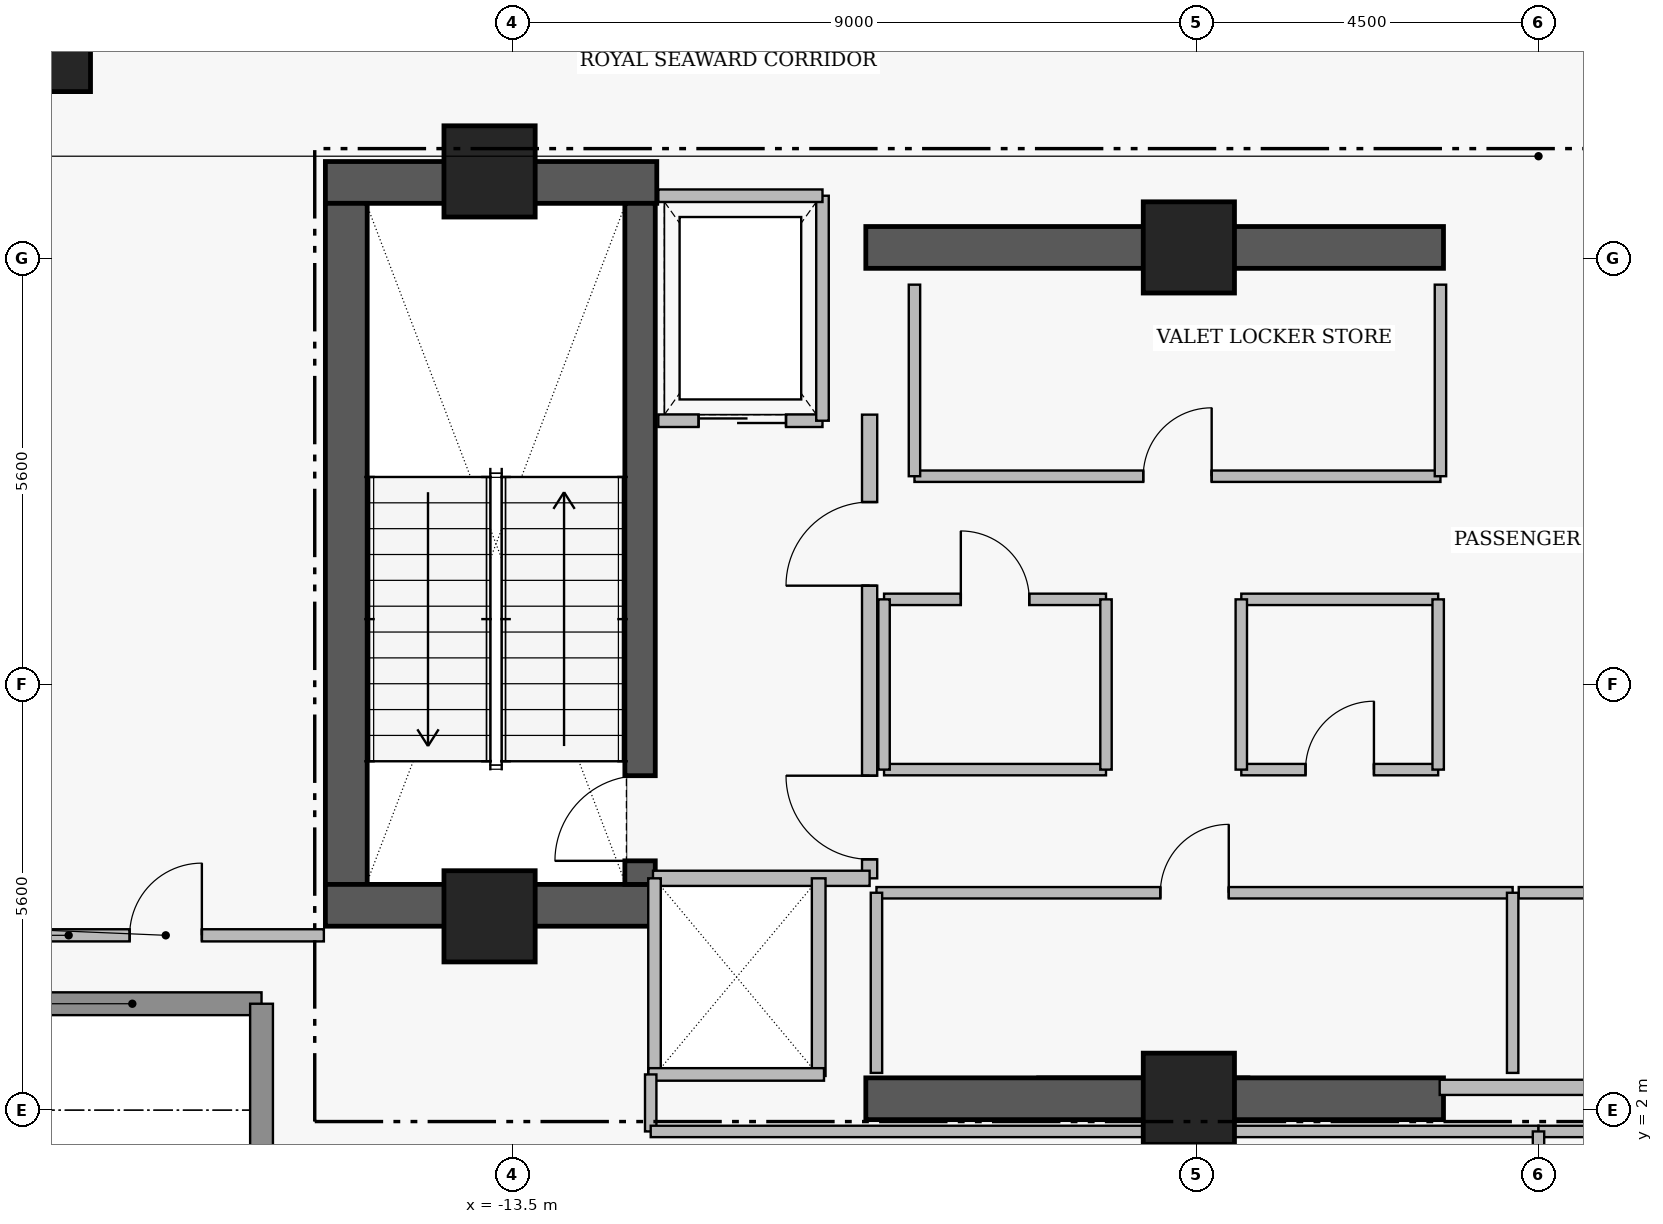
"""IFC4 building model, lengths in metres.
Left out: names, types, materials, properties, quantities, classifications, styles, units other than length and angle.
Written with IfcOpenShell. Run it as: python <this file> out.ifc"""

import sys

from ifc_helpers import new_model, si_unit, direction, frame, frame_2d, origin, origin_2d, place, context, subcontext, project, spatial, rectangle, extrude, element, fill, save


model = new_model("IFC4")
c1 = context("Model", 3, precision=1e-05, world=origin(), true_north=direction((0.0, 1.0)))
c2 = subcontext(c1, "Body", "Model", "MODEL_VIEW")
j1 = project(units=[si_unit("LENGTHUNIT", "METRE"), si_unit("PLANEANGLEUNIT", "RADIAN")], contexts=[c1])
p1 = place(None, origin())
s1 = spatial("IfcSite", under=j1, at=p1, CompositionType="ELEMENT")
p2 = place(p1, origin())
s2 = spatial("IfcBuilding", under=s1, at=p2, CompositionType="ELEMENT")
p3 = place(p2, frame((0.0, 0.0, 288.45)))
s3 = spatial("IfcBuildingStorey", under=s2, at=p3, CompositionType="ELEMENT", Elevation=288.45)
p4 = place(p3, frame((-15.96, 14.205, 0.0), z_axis=(0.0, 0.0, 1.0), x_axis=(1.0, 0.0, 0.0)))
e1 = element("IfcWall", 1, at=p4, inside=s3, PredefinedType="SHEAR", context=c2, shape_type="SweptSolid", body=[
    extrude(rectangle(XDim=4.36, YDim=0.55, at=frame_2d((2.18, 0.0))), origin(), (0.0, 0.0, 1.0), 4.21),
])
p5 = place(p3, frame((-15.685, 4.97, 0.0), z_axis=(0.0, 0.0, 1.0), x_axis=(0.0, 1.0, 0.0)))
e2 = element("IfcWall", 2, at=p5, inside=s3, PredefinedType="SHEAR", context=c2, shape_type="SweptSolid", body=[
    extrude(rectangle(XDim=8.96, YDim=0.55, at=frame_2d((4.48, 0.0))), origin(), (0.0, 0.0, 1.0), 4.21),
])
p6 = place(p3, frame((-15.96, 4.695, 0.0), z_axis=(0.0, 0.0, 1.0), x_axis=(1.0, 0.0, 0.0)))
e3 = element("IfcWall", 3, at=p6, inside=s3, PredefinedType="SHEAR", context=c2, shape_type="SweptSolid", body=[
    extrude(rectangle(XDim=4.36, YDim=0.55, at=frame_2d((2.18, 0.0))), origin(), (0.0, 0.0, 1.0), 4.21),
])
for number, where, z_axis, x_axis in (
    (4, (-8.85, 2.15, 0.0), (0.0, 0.0, 1.0), (1.0, 0.0, 0.0)),
    (5, (-8.85, 13.35, 0.0), (0.0, 0.0, 1.0), (1.0, 0.0, 0.0)),
):
    element("IfcWall", number, at=place(p3, frame(where, z_axis=z_axis, x_axis=x_axis)), inside=s3, PredefinedType="SHEAR", context=c2, shape_type="SweptSolid", body=[
        extrude(rectangle(XDim=7.6, YDim=0.55, at=frame_2d((3.8, 0.0))), origin(), (0.0, 0.0, 1.0), 4.18),
    ])
p7 = place(p3, frame((-11.82, 4.97, 0.0), z_axis=(0.0, 0.0, 1.0), x_axis=(0.0, 1.0, 0.0)))
e6 = element("IfcWall", 6, at=p7, inside=s3, PredefinedType="SHEAR", context=c2, shape_type="SweptSolid", body=[
    extrude(rectangle(XDim=8.96, YDim=0.4, at=frame_2d((4.48, 0.0))), origin(), (0.0, 0.0, 1.0), 4.21),
])
p8 = place(p7, frame((0.31, 0.0, 0.0)))
e7 = element("IfcOpeningElement", 7, at=p8, cuts=e6, PredefinedType="OPENING", context=c2, shape_type="SweptSolid", body=[
    extrude(rectangle(XDim=1.12, YDim=2.22, at=frame_2d((0.56, 1.11))), frame((0.0, 0.21, 0.0), z_axis=(0.0, -1.0, 0.0), x_axis=(1.0, 0.0, 0.0)), (0.0, 0.0, 1.0), 0.42),
])
for number, where, z_axis, x_axis in (
    (8, (-13.8, 14.35, 0.0), (0.0, 0.0, 1.0), (1.0, 0.0, 0.0)),
    (9, (-4.6, 13.35, 0.0), (0.0, 0.0, 1.0), (1.0, 0.0, 0.0)),
    (10, (-13.8, 4.55, 0.0), (0.0, 0.0, 1.0), (1.0, 0.0, 0.0)),
    (11, (-4.6, 2.15, 0.0), (0.0, 0.0, 1.0), (1.0, 0.0, 0.0)),
):
    element("IfcColumn", number, at=place(p3, frame(where, z_axis=z_axis, x_axis=x_axis)), inside=s3, PredefinedType="COLUMN", context=c2, shape_type="SweptSolid", body=[
        extrude(rectangle(XDim=1.2, YDim=1.2, at=origin_2d()), origin(), (0.0, 0.0, 1.0), 4.4),
    ])
p9 = place(p3, frame((-19.55, 15.9, 0.0), z_axis=(0.0, 0.0, 1.0), x_axis=(1.0, 0.0, 0.0)))
e12 = element("IfcColumn", 12, at=p9, inside=s3, PredefinedType="COLUMN", context=c2, shape_type="SweptSolid", body=[
    extrude(rectangle(XDim=1.0, YDim=1.0, at=origin_2d()), origin(), (0.0, 0.0, 1.0), 4.4),
])
for number, where, z_axis, x_axis in (
    (13, (-16.8, 3.4, 0.0), (0.0, 0.0, 1.0), (-1.0, 0.0, 0.0)),
    (14, (-16.8, 0.0, 0.0), (0.0, 0.0, 1.0), (0.0, 1.0, 0.0)),
):
    element("IfcWall", number, at=place(p3, frame(where, z_axis=z_axis, x_axis=x_axis)), inside=s3, PredefinedType="STANDARD", context=c2, shape_type="SweptSolid", body=[
        extrude(rectangle(XDim=3.4, YDim=0.3, at=frame_2d((1.7, 0.0))), origin(), (0.0, 0.0, 1.0), 4.18),
    ])
p10 = place(p3, frame((-8.8, 5.05, 0.0), z_axis=(0.0, 0.0, 1.0), x_axis=(0.0, 1.0, 0.0)))
e15 = element("IfcWall", 15, at=p10, inside=s3, PredefinedType="PARTITIONING", context=c2, shape_type="SweptSolid", body=[
    extrude(rectangle(XDim=6.1, YDim=0.2, at=frame_2d((3.05, 0.0))), origin(), (0.0, 0.0, 1.0), 4.18),
])
p11 = place(p10, frame((0.25, 0.0, 0.0)))
e16 = element("IfcOpeningElement", 16, at=p11, cuts=e15, PredefinedType="OPENING", context=c2, shape_type="SweptSolid", body=[
    extrude(rectangle(XDim=1.1, YDim=2.2, at=frame_2d((0.55, 1.1))), frame((0.0, 0.11, 0.0), z_axis=(0.0, -1.0, 0.0), x_axis=(1.0, 0.0, 0.0)), (0.0, 0.0, 1.0), 0.22),
])
p12 = place(p10, frame((3.85, 0.0, 0.0)))
e17 = element("IfcOpeningElement", 17, at=p12, cuts=e15, PredefinedType="OPENING", context=c2, shape_type="SweptSolid", body=[
    extrude(rectangle(XDim=1.1, YDim=2.2, at=frame_2d((0.55, 1.1))), frame((0.0, 0.11, 0.0), z_axis=(0.0, -1.0, 0.0), x_axis=(1.0, 0.0, 0.0)), (0.0, 0.0, 1.0), 0.22),
])
p13 = place(p3, frame((-11.58, 11.07, 0.0), z_axis=(0.0, 0.0, 1.0), x_axis=(1.0, 0.0, 0.0)))
e18 = element("IfcWall", 18, at=p13, inside=s3, PredefinedType="PARTITIONING", context=c2, shape_type="SweptSolid", body=[
    extrude(rectangle(XDim=2.16, YDim=0.165, at=frame_2d((1.08, 0.0))), origin(), (0.0, 0.0, 1.0), 4.18),
])
p14 = place(p13, frame((0.53, 0.0, 0.0)))
e19 = element("IfcOpeningElement", 19, at=p14, cuts=e18, PredefinedType="OPENING", context=c2, shape_type="SweptSolid", body=[
    extrude(rectangle(XDim=1.15, YDim=2.25, at=frame_2d((0.575, 1.125))), frame((0.0, 0.093, 0.0), z_axis=(0.0, -1.0, 0.0), x_axis=(1.0, 0.0, 0.0)), (0.0, 0.0, 1.0), 0.185),
])
p15 = place(p3, frame((-8.71, 4.86, 0.0), z_axis=(0.0, 0.0, 1.0), x_axis=(1.0, 0.0, 0.0)))
e20 = element("IfcWall", 20, at=p15, inside=s3, PredefinedType="PARTITIONING", context=c2, shape_type="SweptSolid", body=[
    extrude(rectangle(XDim=8.37, YDim=0.15, at=frame_2d((4.185, 0.0))), origin(), (0.0, 0.0, 1.0), 4.18),
])
p16 = place(p15, frame((3.735, 0.0, 0.0)))
e21 = element("IfcOpeningElement", 21, at=p16, cuts=e20, PredefinedType="OPENING", context=c2, shape_type="SweptSolid", body=[
    extrude(rectangle(XDim=0.9, YDim=2.15, at=frame_2d((0.45, 1.075))), frame((0.0, 0.085, 0.0), z_axis=(0.0, -1.0, 0.0), x_axis=(1.0, 0.0, 0.0)), (0.0, 0.0, 1.0), 0.17),
])
p17 = place(p3, frame((-0.26, 4.86, 0.0), z_axis=(0.0, 0.0, 1.0), x_axis=(1.0, 0.0, 0.0)))
e22 = element("IfcWall", 22, at=p17, inside=s3, PredefinedType="PARTITIONING", context=c2, shape_type="SweptSolid", body=[
    extrude(rectangle(XDim=3.97, YDim=0.15, at=frame_2d((1.985, 0.0))), origin(), (0.0, 0.0, 1.0), 4.18),
])
p18 = place(p17, frame((1.535, 0.0, 0.0)))
e23 = element("IfcOpeningElement", 23, at=p18, cuts=e22, PredefinedType="OPENING", context=c2, shape_type="SweptSolid", body=[
    extrude(rectangle(XDim=0.9, YDim=2.15, at=frame_2d((0.45, 1.075))), frame((0.0, 0.085, 0.0), z_axis=(0.0, -1.0, 0.0), x_axis=(1.0, 0.0, 0.0)), (0.0, 0.0, 1.0), 0.17),
])
p19 = place(p3, frame((-8.21, 10.34, 0.0), z_axis=(0.0, 0.0, 1.0), x_axis=(1.0, 0.0, 0.0)))
e24 = element("IfcWall", 24, at=p19, inside=s3, PredefinedType="PARTITIONING", context=c2, shape_type="SweptSolid", body=[
    extrude(rectangle(XDim=6.92, YDim=0.15, at=frame_2d((3.46, 0.0))), origin(), (0.0, 0.0, 1.0), 4.18),
])
p20 = place(p19, frame((3.01, 0.0, 0.0)))
e25 = element("IfcOpeningElement", 25, at=p20, cuts=e24, PredefinedType="OPENING", context=c2, shape_type="SweptSolid", body=[
    extrude(rectangle(XDim=0.9, YDim=2.15, at=frame_2d((0.45, 1.075))), frame((0.0, 0.085, 0.0), z_axis=(0.0, -1.0, 0.0), x_axis=(1.0, 0.0, 0.0)), (0.0, 0.0, 1.0), 0.17),
])
p21 = place(p3, frame((-8.61, 8.72, 0.0), z_axis=(0.0, 0.0, 1.0), x_axis=(1.0, 0.0, 0.0)))
e26 = element("IfcWall", 26, at=p21, inside=s3, PredefinedType="PARTITIONING", context=c2, shape_type="SweptSolid", body=[
    extrude(rectangle(XDim=2.92, YDim=0.15, at=frame_2d((1.46, 0.0))), origin(), (0.0, 0.0, 1.0), 4.18),
])
p22 = place(p21, frame((1.01, 0.0, 0.0)))
e27 = element("IfcOpeningElement", 27, at=p22, cuts=e26, PredefinedType="OPENING", context=c2, shape_type="SweptSolid", body=[
    extrude(rectangle(XDim=0.9, YDim=2.15, at=frame_2d((0.45, 1.075))), frame((0.0, 0.085, 0.0), z_axis=(0.0, -1.0, 0.0), x_axis=(1.0, 0.0, 0.0)), (0.0, 0.0, 1.0), 0.17),
])
p23 = place(p3, frame((-3.91, 6.48, 0.0), z_axis=(0.0, 0.0, 1.0), x_axis=(1.0, 0.0, 0.0)))
e28 = element("IfcWall", 28, at=p23, inside=s3, PredefinedType="PARTITIONING", context=c2, shape_type="SweptSolid", body=[
    extrude(rectangle(XDim=2.59, YDim=0.15, at=frame_2d((1.295, 0.0))), origin(), (0.0, 0.0, 1.0), 4.18),
])
p24 = place(p23, frame((0.845, 0.0, 0.0)))
e29 = element("IfcOpeningElement", 29, at=p24, cuts=e28, PredefinedType="OPENING", context=c2, shape_type="SweptSolid", body=[
    extrude(rectangle(XDim=0.9, YDim=2.15, at=frame_2d((0.45, 1.075))), frame((0.0, 0.085, 0.0), z_axis=(0.0, -1.0, 0.0), x_axis=(1.0, 0.0, 0.0)), (0.0, 0.0, 1.0), 0.17),
])
p25 = place(p3, frame((-20.14, 4.3, 0.0), z_axis=(0.0, 0.0, 1.0), x_axis=(1.0, 0.0, 0.0)))
e30 = element("IfcWall", 30, at=p25, inside=s3, PredefinedType="PARTITIONING", context=c2, shape_type="SweptSolid", body=[
    extrude(rectangle(XDim=4.16, YDim=0.16, at=frame_2d((2.08, 0.0))), origin(), (0.0, 0.0, 1.0), 4.18),
])
p26 = place(p25, frame((1.605, 0.0, 0.0)))
e31 = element("IfcOpeningElement", 31, at=p26, cuts=e30, PredefinedType="OPENING", context=c2, shape_type="SweptSolid", body=[
    extrude(rectangle(XDim=0.95, YDim=2.15, at=frame_2d((0.475, 1.075))), frame((0.0, 0.09, 0.0), z_axis=(0.0, -1.0, 0.0), x_axis=(1.0, 0.0, 0.0)), (0.0, 0.0, 1.0), 0.18),
])
p27 = place(p3, frame((-11.65, 5.05, 0.0), z_axis=(0.0, 0.0, 1.0), x_axis=(1.0, 0.0, 0.0)))
e32 = element("IfcWall", 32, at=p27, inside=s3, PredefinedType="PARTITIONING", context=c2, shape_type="SweptSolid", body=[
    extrude(rectangle(XDim=2.85, YDim=0.2, at=frame_2d((1.425, 0.0))), origin(), (0.0, 0.0, 1.0), 4.18),
])
p28 = place(p3, frame((-9.42, 11.07, 0.0), z_axis=(0.0, 0.0, 1.0), x_axis=(0.0, 1.0, 0.0)))
e33 = element("IfcWall", 33, at=p28, inside=s3, PredefinedType="PARTITIONING", context=c2, shape_type="SweptSolid", body=[
    extrude(rectangle(XDim=2.96, YDim=0.165, at=frame_2d((1.48, 0.0))), origin(), (0.0, 0.0, 1.0), 4.18),
])
p29 = place(p3, frame((-11.58, 14.03, 0.0), z_axis=(0.0, 0.0, 1.0), x_axis=(1.0, 0.0, 0.0)))
e34 = element("IfcWall", 34, at=p29, inside=s3, PredefinedType="PARTITIONING", context=c2, shape_type="SweptSolid", body=[
    extrude(rectangle(XDim=2.16, YDim=0.165, at=frame_2d((1.08, 0.0))), origin(), (0.0, 0.0, 1.0), 4.18),
])
p30 = place(p3, frame((-1.3, 2.3, 0.0), z_axis=(0.0, 0.0, 1.0), x_axis=(1.0, 0.0, 0.0)))
e35 = element("IfcWall", 35, at=p30, inside=s3, PredefinedType="PARTITIONING", context=c2, shape_type="SweptSolid", body=[
    extrude(rectangle(XDim=2.6, YDim=0.2, at=frame_2d((1.3, 0.0))), origin(), (0.0, 0.0, 1.0), 3.08),
])
for number, where, z_axis, x_axis in (
    (36, (-8.71, 2.49, 0.0), (0.0, 0.0, 1.0), (0.0, 1.0, 0.0)),
    (37, (-0.34, 2.49, 0.0), (0.0, 0.0, 1.0), (0.0, 1.0, 0.0)),
):
    element("IfcWall", number, at=place(p3, frame(where, z_axis=z_axis, x_axis=x_axis)), inside=s3, PredefinedType="PARTITIONING", context=c2, shape_type="SweptSolid", body=[
        extrude(rectangle(XDim=2.37, YDim=0.15, at=frame_2d((1.185, 0.0))), origin(), (0.0, 0.0, 1.0), 4.18),
    ])
for number, where, z_axis, x_axis in (
    (38, (-8.21, 10.34, 0.0), (0.0, 0.0, 1.0), (0.0, 1.0, 0.0)),
    (39, (-1.29, 10.34, 0.0), (0.0, 0.0, 1.0), (0.0, 1.0, 0.0)),
):
    element("IfcWall", number, at=place(p3, frame(where, z_axis=z_axis, x_axis=x_axis)), inside=s3, PredefinedType="PARTITIONING", context=c2, shape_type="SweptSolid", body=[
        extrude(rectangle(XDim=2.52, YDim=0.15, at=frame_2d((1.26, 0.0))), origin(), (0.0, 0.0, 1.0), 4.18),
    ])
p31 = place(p3, frame((-9.47, 2.45, 0.0), z_axis=(0.0, 0.0, 1.0), x_axis=(0.0, 1.0, 0.0)))
e40 = element("IfcWall", 40, at=p31, inside=s3, PredefinedType="PARTITIONING", context=c2, shape_type="SweptSolid", body=[
    extrude(rectangle(XDim=2.6, YDim=0.18, at=frame_2d((1.3, 0.0))), origin(), (0.0, 0.0, 1.0), 4.18),
])
p32 = place(p3, frame((-11.63, 2.47, 0.0), z_axis=(0.0, 0.0, 1.0), x_axis=(0.0, 1.0, 0.0)))
e41 = element("IfcWall", 41, at=p32, inside=s3, PredefinedType="PARTITIONING", context=c2, shape_type="SweptSolid", body=[
    extrude(rectangle(XDim=2.58, YDim=0.165, at=frame_2d((1.29, 0.0))), origin(), (0.0, 0.0, 1.0), 4.18),
])
p33 = place(p3, frame((-11.71, 2.47, 0.0), z_axis=(0.0, 0.0, 1.0), x_axis=(1.0, 0.0, 0.0)))
e42 = element("IfcWall", 42, at=p33, inside=s3, PredefinedType="PARTITIONING", context=c2, shape_type="SweptSolid", body=[
    extrude(rectangle(XDim=2.31, YDim=0.165, at=frame_2d((1.155, 0.0))), origin(), (0.0, 0.0, 1.0), 3.08),
])
p34 = place(p3, frame((-8.61, 6.48, 0.0), z_axis=(0.0, 0.0, 1.0), x_axis=(1.0, 0.0, 0.0)))
e43 = element("IfcWall", 43, at=p34, inside=s3, PredefinedType="PARTITIONING", context=c2, shape_type="SweptSolid", body=[
    extrude(rectangle(XDim=2.92, YDim=0.15, at=frame_2d((1.46, 0.0))), origin(), (0.0, 0.0, 1.0), 4.18),
])
for number, where, z_axis, x_axis in (
    (44, (-8.61, 6.48, 0.0), (0.0, 0.0, 1.0), (0.0, 1.0, 0.0)),
    (45, (-5.69, 6.48, 0.0), (0.0, 0.0, 1.0), (0.0, 1.0, 0.0)),
):
    element("IfcWall", number, at=place(p3, frame(where, z_axis=z_axis, x_axis=x_axis)), inside=s3, PredefinedType="PARTITIONING", context=c2, shape_type="SweptSolid", body=[
        extrude(rectangle(XDim=2.24, YDim=0.15, at=frame_2d((1.12, 0.0))), origin(), (0.0, 0.0, 1.0), 4.18),
    ])
p35 = place(p3, frame((-3.91, 8.72, 0.0), z_axis=(0.0, 0.0, 1.0), x_axis=(1.0, 0.0, 0.0)))
e46 = element("IfcWall", 46, at=p35, inside=s3, PredefinedType="PARTITIONING", context=c2, shape_type="SweptSolid", body=[
    extrude(rectangle(XDim=2.59, YDim=0.15, at=frame_2d((1.295, 0.0))), origin(), (0.0, 0.0, 1.0), 4.18),
])
for number, where, z_axis, x_axis in (
    (47, (-3.91, 6.48, 0.0), (0.0, 0.0, 1.0), (0.0, 1.0, 0.0)),
    (48, (-1.32, 6.48, 0.0), (0.0, 0.0, 1.0), (0.0, 1.0, 0.0)),
):
    element("IfcWall", number, at=place(p3, frame(where, z_axis=z_axis, x_axis=x_axis)), inside=s3, PredefinedType="PARTITIONING", context=c2, shape_type="SweptSolid", body=[
        extrude(rectangle(XDim=2.24, YDim=0.15, at=frame_2d((1.12, 0.0))), origin(), (0.0, 0.0, 1.0), 4.18),
    ])
p36 = place(p3, frame((-11.68, 1.72, 0.0), z_axis=(0.0, 0.0, 1.0), x_axis=(0.0, 1.0, 0.0)))
e49 = element("IfcWall", 49, at=p36, inside=s3, PredefinedType="PARTITIONING", context=c2, shape_type="SweptSolid", body=[
    extrude(rectangle(XDim=0.75, YDim=0.15, at=frame_2d((0.375, 0.0))), origin(), (0.0, 0.0, 1.0), 4.18),
])
for number, where, z_axis, x_axis in (
    (50, (-11.68, 1.72, 0.0), (0.0, 0.0, 1.0), (1.0, 0.0, 0.0)),
    (51, (0.0, 1.72, 0.0), (0.0, 0.0, 1.0), (1.0, 0.0, 0.0)),
):
    element("IfcWall", number, at=place(p3, frame(where, z_axis=z_axis, x_axis=x_axis)), inside=s3, PredefinedType="PARTITIONING", context=c2, shape_type="SweptSolid", body=[
        extrude(rectangle(XDim=11.68, YDim=0.15, at=frame_2d((5.84, 0.0))), origin(), (0.0, 0.0, 1.0), 3.08),
    ])
p37 = place(p3, frame((0.0, 0.06, 0.0), z_axis=(0.0, 0.0, 1.0), x_axis=(0.0, 1.0, 0.0)))
e52 = element("IfcWall", 52, at=p37, inside=s3, PredefinedType="PARTITIONING", context=c2, shape_type="SweptSolid", body=[
    extrude(rectangle(XDim=1.66, YDim=0.15, at=frame_2d((0.83, 0.0))), origin(), (0.0, 0.0, 1.0), 4.18),
])
p38 = place(p8, origin())
e53 = element("IfcDoor", 53, at=p38, inside=s3, OperationType="SINGLE_SWING_LEFT", PredefinedType="DOOR", context=c2, shape_type="SweptSolid", body=[
    extrude(rectangle(XDim=1.12, YDim=2.22, at=frame_2d((0.56, 1.11))), frame((0.0, 0.025, 0.0), z_axis=(0.0, -1.0, 0.0), x_axis=(1.0, 0.0, 0.0)), (0.0, 0.0, 1.0), 0.05),
])
fill(e7, e53)
p39 = place(p11, origin())
e54 = element("IfcDoor", 54, at=p39, inside=s3, OperationType="SINGLE_SWING_RIGHT", PredefinedType="DOOR", context=c2, shape_type="SweptSolid", body=[
    extrude(rectangle(XDim=1.1, YDim=2.2, at=frame_2d((0.55, 1.1))), frame((0.0, 0.025, 0.0), z_axis=(0.0, -1.0, 0.0), x_axis=(1.0, 0.0, 0.0)), (0.0, 0.0, 1.0), 0.05),
])
fill(e16, e54)
p40 = place(p12, origin())
e55 = element("IfcDoor", 55, at=p40, inside=s3, OperationType="SINGLE_SWING_LEFT", PredefinedType="DOOR", context=c2, shape_type="SweptSolid", body=[
    extrude(rectangle(XDim=1.1, YDim=2.2, at=frame_2d((0.55, 1.1))), frame((0.0, 0.025, 0.0), z_axis=(0.0, -1.0, 0.0), x_axis=(1.0, 0.0, 0.0)), (0.0, 0.0, 1.0), 0.05),
])
fill(e17, e55)
p41 = place(p14, origin())
e56 = element("IfcDoor", 56, at=p41, inside=s3, OperationType="SLIDING_TO_LEFT", PredefinedType="DOOR", context=c2, shape_type="SweptSolid", body=[
    extrude(rectangle(XDim=1.15, YDim=2.25, at=frame_2d((0.575, 1.125))), frame((0.0, 0.025, 0.0), z_axis=(0.0, -1.0, 0.0), x_axis=(1.0, 0.0, 0.0)), (0.0, 0.0, 1.0), 0.05),
])
fill(e19, e56)
p42 = place(p16, origin())
e57 = element("IfcDoor", 57, at=p42, inside=s3, OperationType="SINGLE_SWING_RIGHT", PredefinedType="DOOR", context=c2, shape_type="SweptSolid", body=[
    extrude(rectangle(XDim=0.9, YDim=2.15, at=frame_2d((0.45, 1.075))), frame((0.0, 0.025, 0.0), z_axis=(0.0, -1.0, 0.0), x_axis=(1.0, 0.0, 0.0)), (0.0, 0.0, 1.0), 0.05),
])
fill(e21, e57)
p43 = place(p20, origin())
e58 = element("IfcDoor", 58, at=p43, inside=s3, OperationType="SINGLE_SWING_RIGHT", PredefinedType="DOOR", context=c2, shape_type="SweptSolid", body=[
    extrude(rectangle(XDim=0.9, YDim=2.15, at=frame_2d((0.45, 1.075))), frame((0.0, 0.025, 0.0), z_axis=(0.0, -1.0, 0.0), x_axis=(1.0, 0.0, 0.0)), (0.0, 0.0, 1.0), 0.05),
])
fill(e25, e58)
p44 = place(p22, origin())
e59 = element("IfcDoor", 59, at=p44, inside=s3, OperationType="SINGLE_SWING_LEFT", PredefinedType="DOOR", context=c2, shape_type="SweptSolid", body=[
    extrude(rectangle(XDim=0.9, YDim=2.15, at=frame_2d((0.45, 1.075))), frame((0.0, 0.025, 0.0), z_axis=(0.0, -1.0, 0.0), x_axis=(1.0, 0.0, 0.0)), (0.0, 0.0, 1.0), 0.05),
])
fill(e27, e59)
p45 = place(p24, origin())
e60 = element("IfcDoor", 60, at=p45, inside=s3, OperationType="SINGLE_SWING_RIGHT", PredefinedType="DOOR", context=c2, shape_type="SweptSolid", body=[
    extrude(rectangle(XDim=0.9, YDim=2.15, at=frame_2d((0.45, 1.075))), frame((0.0, 0.025, 0.0), z_axis=(0.0, -1.0, 0.0), x_axis=(1.0, 0.0, 0.0)), (0.0, 0.0, 1.0), 0.05),
])
fill(e29, e60)
p46 = place(p26, origin())
e61 = element("IfcDoor", 61, at=p46, inside=s3, OperationType="SINGLE_SWING_RIGHT", PredefinedType="DOOR", context=c2, shape_type="SweptSolid", body=[
    extrude(rectangle(XDim=0.95, YDim=2.15, at=frame_2d((0.475, 1.075))), frame((0.0, 0.025, 0.0), z_axis=(0.0, -1.0, 0.0), x_axis=(1.0, 0.0, 0.0)), (0.0, 0.0, 1.0), 0.05),
])
fill(e31, e61)
save(model, sys.argv[1])
